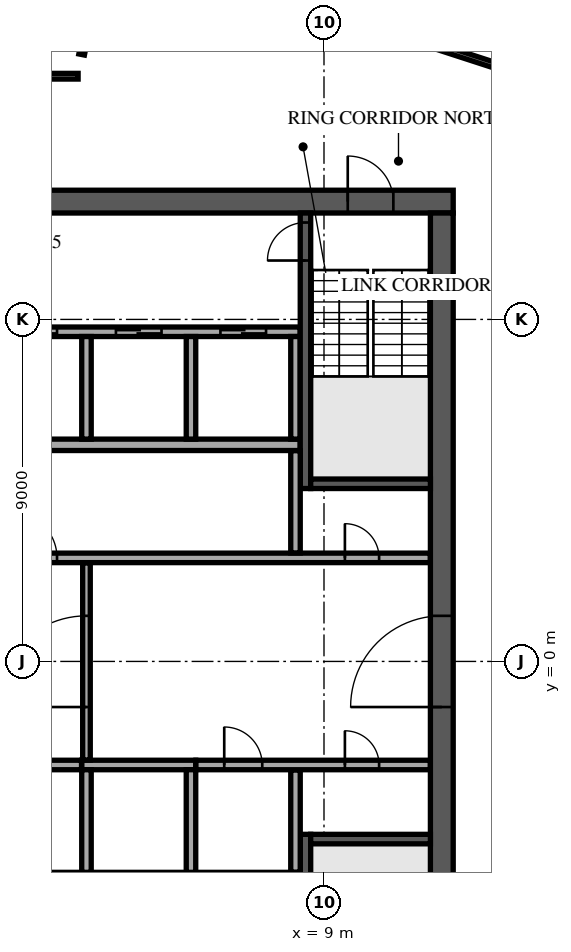
"""IFC4 building model, lengths in metres.
Left out: names, types, materials, properties, quantities, classifications, styles, units other than length and angle.
Written with IfcOpenShell. Run it as: python <this file> out.ifc"""

import sys

from ifc_helpers import new_model, si_unit, direction, frame, frame_2d, origin, place, context, subcontext, project, spatial, rectangle, extrude, element, fill, save


model = new_model("IFC4")
c1 = context("Model", 3, precision=1e-05, world=origin(), true_north=direction((0.0, 1.0)))
c2 = subcontext(c1, "Body", "Model", "MODEL_VIEW")
j1 = project(units=[si_unit("LENGTHUNIT", "METRE"), si_unit("PLANEANGLEUNIT", "RADIAN")], contexts=[c1])
p1 = place(None, origin())
s1 = spatial("IfcSite", under=j1, at=p1, CompositionType="ELEMENT")
p2 = place(p1, origin())
s2 = spatial("IfcBuilding", under=s1, at=p2, CompositionType="ELEMENT")
p3 = place(p2, frame((0.0, 0.0, 316.5)))
s3 = spatial("IfcBuildingStorey", under=s2, at=p3, CompositionType="ELEMENT", Elevation=316.5)
p4 = place(p3, frame((-12.4, 12.1, 0.0), z_axis=(0.0, 0.0, 1.0), x_axis=(1.0, 0.0, 0.0)))
e1 = element("IfcWall", 1, at=p4, inside=s3, PredefinedType="SHEAR", context=c2, shape_type="SweptSolid", body=[
    extrude(rectangle(XDim=24.8, YDim=0.6, at=frame_2d((12.4, 0.0))), origin(), (0.0, 0.0, 1.0), 3.65),
])
p5 = place(p4, frame((11.2, 0.0, 0.0)))
e2 = element("IfcOpeningElement", 2, at=p5, cuts=e1, PredefinedType="OPENING", context=c2, shape_type="SweptSolid", body=[
    extrude(rectangle(XDim=2.4, YDim=2.4, at=frame_2d((1.2, 1.2))), frame((0.0, 0.31, 0.0), z_axis=(0.0, -1.0, 0.0), x_axis=(1.0, 0.0, 0.0)), (0.0, 0.0, 1.0), 0.62),
])
p6 = place(p4, frame((22.025, 0.0, 0.0)))
e3 = element("IfcOpeningElement", 3, at=p6, cuts=e1, PredefinedType="OPENING", context=c2, shape_type="SweptSolid", body=[
    extrude(rectangle(XDim=1.2, YDim=2.1, at=frame_2d((0.6, 1.05))), frame((0.0, 0.31, 0.0), z_axis=(0.0, -1.0, 0.0), x_axis=(1.0, 0.0, 0.0)), (0.0, 0.0, 1.0), 0.62),
])
p7 = place(p4, frame((1.0, 0.0, 0.0)))
e4 = element("IfcOpeningElement", 4, at=p7, cuts=e1, PredefinedType="OPENING", context=c2, shape_type="SweptSolid", body=[
    extrude(rectangle(XDim=1.0, YDim=2.1, at=frame_2d((0.5, 1.05))), frame((0.0, 0.31, 0.0), z_axis=(0.0, -1.0, 0.0), x_axis=(1.0, 0.0, 0.0)), (0.0, 0.0, 1.0), 0.62),
])
p8 = place(p3, frame((12.1, -11.8, 0.0), z_axis=(0.0, 0.0, 1.0), x_axis=(0.0, 1.0, 0.0)))
e5 = element("IfcWall", 5, at=p8, inside=s3, PredefinedType="SHEAR", context=c2, shape_type="SweptSolid", body=[
    extrude(rectangle(XDim=23.6, YDim=0.6, at=frame_2d((11.8, 0.0))), origin(), (0.0, 0.0, 1.0), 3.65),
])
p9 = place(p8, frame((10.6, 0.0, 0.0)))
e6 = element("IfcOpeningElement", 6, at=p9, cuts=e5, PredefinedType="OPENING", context=c2, shape_type="SweptSolid", body=[
    extrude(rectangle(XDim=2.4, YDim=2.4, at=frame_2d((1.2, 1.2))), frame((0.0, 0.31, 0.0), z_axis=(0.0, -1.0, 0.0), x_axis=(1.0, 0.0, 0.0)), (0.0, 0.0, 1.0), 0.62),
])
p10 = place(p3, frame((-8.375, 5.7, 0.0), z_axis=(0.0, 0.0, 1.0), x_axis=(1.0, 0.0, 0.0)))
e7 = element("IfcWall", 7, at=p10, inside=s3, PredefinedType="SOLIDWALL", context=c2, shape_type="SweptSolid", body=[
    extrude(rectangle(XDim=16.75, YDim=0.3, at=frame_2d((8.375, 0.0))), origin(), (0.0, 0.0, 1.0), 3.65),
])
p11 = place(p3, frame((-2.875, -5.7, 0.0), z_axis=(0.0, 0.0, 1.0), x_axis=(1.0, 0.0, 0.0)))
e8 = element("IfcWall", 8, at=p11, inside=s3, PredefinedType="SOLIDWALL", context=c2, shape_type="SweptSolid", body=[
    extrude(rectangle(XDim=11.25, YDim=0.3, at=frame_2d((5.625, 0.0))), origin(), (0.0, 0.0, 1.0), 3.65),
])
p12 = place(p3, frame((-8.375, 8.675, 0.0), z_axis=(0.0, 0.0, 1.0), x_axis=(1.0, 0.0, 0.0)))
e9 = element("IfcWall", 9, at=p12, inside=s3, PredefinedType="SOLIDWALL", context=c2, shape_type="SweptSolid", body=[
    extrude(rectangle(XDim=16.75, YDim=0.25, at=frame_2d((8.375, 0.0))), origin(), (0.0, 0.0, 1.0), 3.65),
])
p13 = place(p12, frame((0.9, 0.0, 0.0)))
e10 = element("IfcOpeningElement", 10, at=p13, cuts=e9, PredefinedType="OPENING", context=c2, shape_type="SweptSolid", body=[
    extrude(rectangle(XDim=1.2, YDim=2.1, at=frame_2d((0.6, 1.05))), frame((0.0, 0.135, 0.0), z_axis=(0.0, -1.0, 0.0), x_axis=(1.0, 0.0, 0.0)), (0.0, 0.0, 1.0), 0.27),
])
p14 = place(p12, frame((3.65, 0.0, 0.0)))
e11 = element("IfcOpeningElement", 11, at=p14, cuts=e9, PredefinedType="OPENING", context=c2, shape_type="SweptSolid", body=[
    extrude(rectangle(XDim=1.2, YDim=2.1, at=frame_2d((0.6, 1.05))), frame((0.0, 0.135, 0.0), z_axis=(0.0, -1.0, 0.0), x_axis=(1.0, 0.0, 0.0)), (0.0, 0.0, 1.0), 0.27),
])
p15 = place(p12, frame((6.4, 0.0, 0.0)))
e12 = element("IfcOpeningElement", 12, at=p15, cuts=e9, PredefinedType="OPENING", context=c2, shape_type="SweptSolid", body=[
    extrude(rectangle(XDim=1.2, YDim=2.1, at=frame_2d((0.6, 1.05))), frame((0.0, 0.135, 0.0), z_axis=(0.0, -1.0, 0.0), x_axis=(1.0, 0.0, 0.0)), (0.0, 0.0, 1.0), 0.27),
])
p16 = place(p12, frame((9.15, 0.0, 0.0)))
e13 = element("IfcOpeningElement", 13, at=p16, cuts=e9, PredefinedType="OPENING", context=c2, shape_type="SweptSolid", body=[
    extrude(rectangle(XDim=1.2, YDim=2.1, at=frame_2d((0.6, 1.05))), frame((0.0, 0.135, 0.0), z_axis=(0.0, -1.0, 0.0), x_axis=(1.0, 0.0, 0.0)), (0.0, 0.0, 1.0), 0.27),
])
p17 = place(p12, frame((11.9, 0.0, 0.0)))
e14 = element("IfcOpeningElement", 14, at=p17, cuts=e9, PredefinedType="OPENING", context=c2, shape_type="SweptSolid", body=[
    extrude(rectangle(XDim=1.2, YDim=2.1, at=frame_2d((0.6, 1.05))), frame((0.0, 0.135, 0.0), z_axis=(0.0, -1.0, 0.0), x_axis=(1.0, 0.0, 0.0)), (0.0, 0.0, 1.0), 0.27),
])
p18 = place(p12, frame((14.65, 0.0, 0.0)))
e15 = element("IfcOpeningElement", 15, at=p18, cuts=e9, PredefinedType="OPENING", context=c2, shape_type="SweptSolid", body=[
    extrude(rectangle(XDim=1.2, YDim=2.1, at=frame_2d((0.6, 1.05))), frame((0.0, 0.135, 0.0), z_axis=(0.0, -1.0, 0.0), x_axis=(1.0, 0.0, 0.0)), (0.0, 0.0, 1.0), 0.27),
])
for number, where, z_axis, x_axis in (
    (16, (2.75, 5.85, 0.0), (0.0, 0.0, 1.0), (0.0, 1.0, 0.0)),
    (17, (5.5, 5.85, 0.0), (0.0, 0.0, 1.0), (0.0, 1.0, 0.0)),
    (18, (8.25, 5.85, 0.0), (0.0, 0.0, 1.0), (0.0, 1.0, 0.0)),
):
    element("IfcWall", number, at=place(p3, frame(where, z_axis=z_axis, x_axis=x_axis)), inside=s3, PredefinedType="SOLIDWALL", context=c2, shape_type="SweptSolid", body=[
        extrude(rectangle(XDim=2.7, YDim=0.25, at=frame_2d((1.35, 0.0))), origin(), (0.0, 0.0, 1.0), 3.65),
    ])
p19 = place(p3, frame((2.625, -2.725, 0.0), z_axis=(0.0, 0.0, 1.0), x_axis=(1.0, 0.0, 0.0)))
e19 = element("IfcWall", 19, at=p19, inside=s3, PredefinedType="SOLIDWALL", context=c2, shape_type="SweptSolid", body=[
    extrude(rectangle(XDim=3.0, YDim=0.25, at=frame_2d((1.5, 0.0))), origin(), (0.0, 0.0, 1.0), 3.65),
])
for number, where, z_axis, x_axis in (
    (20, (2.75, -5.55, 0.0), (0.0, 0.0, 1.0), (0.0, 1.0, 0.0)),
    (21, (5.5, -5.55, 0.0), (0.0, 0.0, 1.0), (0.0, 1.0, 0.0)),
):
    element("IfcWall", number, at=place(p3, frame(where, z_axis=z_axis, x_axis=x_axis)), inside=s3, PredefinedType="SOLIDWALL", context=c2, shape_type="SweptSolid", body=[
        extrude(rectangle(XDim=2.7, YDim=0.25, at=frame_2d((1.35, 0.0))), origin(), (0.0, 0.0, 1.0), 3.65),
    ])
p20 = place(p3, frame((8.512, 4.55, 0.0), z_axis=(0.0, 0.0, 1.0), x_axis=(0.0, 1.0, 0.0)))
e22 = element("IfcWall", 22, at=p20, inside=s3, PredefinedType="SOLIDWALL", context=c2, shape_type="SweptSolid", body=[
    extrude(rectangle(XDim=7.25, YDim=0.275, at=frame_2d((3.625, 0.0))), origin(), (0.0, 0.0, 1.0), 3.65),
])
p21 = place(p20, frame((6.0, 0.0, 0.0)))
e23 = element("IfcOpeningElement", 23, at=p21, cuts=e22, PredefinedType="OPENING", context=c2, shape_type="SweptSolid", body=[
    extrude(rectangle(XDim=1.0, YDim=2.1, at=frame_2d((0.5, 1.05))), frame((0.0, 0.147, 0.0), z_axis=(0.0, -1.0, 0.0), x_axis=(1.0, 0.0, 0.0)), (0.0, 0.0, 1.0), 0.295),
])
p22 = place(p3, frame((8.65, 4.675, 0.0), z_axis=(0.0, 0.0, 1.0), x_axis=(1.0, 0.0, 0.0)))
e24 = element("IfcWall", 24, at=p22, inside=s3, PredefinedType="SOLIDWALL", context=c2, shape_type="SweptSolid", body=[
    extrude(rectangle(XDim=3.15, YDim=0.25, at=frame_2d((1.575, 0.0))), origin(), (0.0, 0.0, 1.0), 3.65),
])
p23 = place(p3, frame((8.512, -4.55, 0.0), z_axis=(0.0, 0.0, 1.0), x_axis=(0.0, -1.0, 0.0)))
e25 = element("IfcWall", 25, at=p23, inside=s3, PredefinedType="SOLIDWALL", context=c2, shape_type="SweptSolid", body=[
    extrude(rectangle(XDim=7.25, YDim=0.275, at=frame_2d((3.625, 0.0))), origin(), (0.0, 0.0, 1.0), 3.65),
])
p24 = place(p23, frame((6.0, 0.0, 0.0)))
e26 = element("IfcOpeningElement", 26, at=p24, cuts=e25, PredefinedType="OPENING", context=c2, shape_type="SweptSolid", body=[
    extrude(rectangle(XDim=1.0, YDim=2.1, at=frame_2d((0.5, 1.05))), frame((0.0, 0.147, 0.0), z_axis=(0.0, -1.0, 0.0), x_axis=(1.0, 0.0, 0.0)), (0.0, 0.0, 1.0), 0.295),
])
p25 = place(p3, frame((8.65, -4.675, 0.0), z_axis=(0.0, 0.0, 1.0), x_axis=(1.0, 0.0, 0.0)))
e27 = element("IfcWall", 27, at=p25, inside=s3, PredefinedType="SOLIDWALL", context=c2, shape_type="SweptSolid", body=[
    extrude(rectangle(XDim=3.15, YDim=0.25, at=frame_2d((1.575, 0.0))), origin(), (0.0, 0.0, 1.0), 3.65),
])
p26 = place(p3, frame((8.25, -5.545, 0.0), z_axis=(0.0, 0.0, 1.0), x_axis=(0.0, 1.0, 0.0)))
e28 = element("IfcWall", 28, at=p26, inside=s3, PredefinedType="PARTITIONING", context=c2, shape_type="SweptSolid", body=[
    extrude(rectangle(XDim=2.69, YDim=0.25, at=frame_2d((1.345, 0.0))), origin(), (0.0, 0.0, 1.0), 3.65),
])
p27 = place(p3, frame((-11.795, -2.725, 0.0), z_axis=(0.0, 0.0, 1.0), x_axis=(1.0, 0.0, 0.0)))
e29 = element("IfcWall", 29, at=p27, inside=s3, PredefinedType="PARTITIONING", context=c2, shape_type="SweptSolid", body=[
    extrude(rectangle(XDim=14.415, YDim=0.25, at=frame_2d((7.208, 0.0))), origin(), (0.0, 0.0, 1.0), 3.65),
])
p28 = place(p27, frame((1.295, 0.0, 0.0)))
e30 = element("IfcOpeningElement", 30, at=p28, cuts=e29, PredefinedType="OPENING", context=c2, shape_type="SweptSolid", body=[
    extrude(rectangle(XDim=1.0, YDim=2.1, at=frame_2d((0.5, 1.05))), frame((0.0, 0.135, 0.0), z_axis=(0.0, -1.0, 0.0), x_axis=(1.0, 0.0, 0.0)), (0.0, 0.0, 1.0), 0.27),
])
p29 = place(p27, frame((4.42, 0.0, 0.0)))
e31 = element("IfcOpeningElement", 31, at=p29, cuts=e29, PredefinedType="OPENING", context=c2, shape_type="SweptSolid", body=[
    extrude(rectangle(XDim=1.0, YDim=2.1, at=frame_2d((0.5, 1.05))), frame((0.0, 0.135, 0.0), z_axis=(0.0, -1.0, 0.0), x_axis=(1.0, 0.0, 0.0)), (0.0, 0.0, 1.0), 0.27),
])
p30 = place(p27, frame((9.92, 0.0, 0.0)))
e32 = element("IfcOpeningElement", 32, at=p30, cuts=e29, PredefinedType="OPENING", context=c2, shape_type="SweptSolid", body=[
    extrude(rectangle(XDim=1.0, YDim=2.1, at=frame_2d((0.5, 1.05))), frame((0.0, 0.135, 0.0), z_axis=(0.0, -1.0, 0.0), x_axis=(1.0, 0.0, 0.0)), (0.0, 0.0, 1.0), 0.27),
])
p31 = place(p3, frame((5.63, -2.725, 0.0), z_axis=(0.0, 0.0, 1.0), x_axis=(1.0, 0.0, 0.0)))
e33 = element("IfcWall", 33, at=p31, inside=s3, PredefinedType="PARTITIONING", context=c2, shape_type="SweptSolid", body=[
    extrude(rectangle(XDim=6.165, YDim=0.25, at=frame_2d((3.083, 0.0))), origin(), (0.0, 0.0, 1.0), 3.65),
])
p32 = place(p31, frame((0.745, 0.0, 0.0)))
e34 = element("IfcOpeningElement", 34, at=p32, cuts=e33, PredefinedType="OPENING", context=c2, shape_type="SweptSolid", body=[
    extrude(rectangle(XDim=1.0, YDim=2.1, at=frame_2d((0.5, 1.05))), frame((0.0, 0.135, 0.0), z_axis=(0.0, -1.0, 0.0), x_axis=(1.0, 0.0, 0.0)), (0.0, 0.0, 1.0), 0.27),
])
p33 = place(p31, frame((3.92, 0.0, 0.0)))
e35 = element("IfcOpeningElement", 35, at=p33, cuts=e33, PredefinedType="OPENING", context=c2, shape_type="SweptSolid", body=[
    extrude(rectangle(XDim=0.9, YDim=2.1, at=frame_2d((0.45, 1.05))), frame((0.0, 0.135, 0.0), z_axis=(0.0, -1.0, 0.0), x_axis=(1.0, 0.0, 0.0)), (0.0, 0.0, 1.0), 0.27),
])
p34 = place(p3, frame((2.75, -2.595, 0.0), z_axis=(0.0, 0.0, 1.0), x_axis=(0.0, 1.0, 0.0)))
e36 = element("IfcWall", 36, at=p34, inside=s3, PredefinedType="PARTITIONING", context=c2, shape_type="SweptSolid", body=[
    extrude(rectangle(XDim=5.19, YDim=0.2, at=frame_2d((2.595, 0.0))), origin(), (0.0, 0.0, 1.0), 3.65),
])
p35 = place(p34, frame((1.395, 0.0, 0.0)))
e37 = element("IfcOpeningElement", 37, at=p35, cuts=e36, PredefinedType="OPENING", context=c2, shape_type="SweptSolid", body=[
    extrude(rectangle(XDim=2.4, YDim=2.4, at=frame_2d((1.2, 1.2))), frame((0.0, 0.11, 0.0), z_axis=(0.0, -1.0, 0.0), x_axis=(1.0, 0.0, 0.0)), (0.0, 0.0, 1.0), 0.22),
])
p36 = place(p3, frame((-11.795, 2.725, 0.0), z_axis=(0.0, 0.0, 1.0), x_axis=(1.0, 0.0, 0.0)))
e38 = element("IfcWall", 38, at=p36, inside=s3, PredefinedType="PARTITIONING", context=c2, shape_type="SweptSolid", body=[
    extrude(rectangle(XDim=23.59, YDim=0.25, at=frame_2d((11.795, 0.0))), origin(), (0.0, 0.0, 1.0), 3.65),
])
p37 = place(p36, frame((21.345, 0.0, 0.0)))
e39 = element("IfcOpeningElement", 39, at=p37, cuts=e38, PredefinedType="OPENING", context=c2, shape_type="SweptSolid", body=[
    extrude(rectangle(XDim=0.9, YDim=2.1, at=frame_2d((0.45, 1.05))), frame((0.0, 0.135, 0.0), z_axis=(0.0, -1.0, 0.0), x_axis=(1.0, 0.0, 0.0)), (0.0, 0.0, 1.0), 0.27),
])
p38 = place(p36, frame((1.345, 0.0, 0.0)))
e40 = element("IfcOpeningElement", 40, at=p38, cuts=e38, PredefinedType="OPENING", context=c2, shape_type="SweptSolid", body=[
    extrude(rectangle(XDim=0.9, YDim=2.1, at=frame_2d((0.45, 1.05))), frame((0.0, 0.135, 0.0), z_axis=(0.0, -1.0, 0.0), x_axis=(1.0, 0.0, 0.0)), (0.0, 0.0, 1.0), 0.27),
])
p39 = place(p36, frame((4.42, 0.0, 0.0)))
e41 = element("IfcOpeningElement", 41, at=p39, cuts=e38, PredefinedType="OPENING", context=c2, shape_type="SweptSolid", body=[
    extrude(rectangle(XDim=1.0, YDim=2.1, at=frame_2d((0.5, 1.05))), frame((0.0, 0.135, 0.0), z_axis=(0.0, -1.0, 0.0), x_axis=(1.0, 0.0, 0.0)), (0.0, 0.0, 1.0), 0.27),
])
p40 = place(p36, frame((7.17, 0.0, 0.0)))
e42 = element("IfcOpeningElement", 42, at=p40, cuts=e38, PredefinedType="OPENING", context=c2, shape_type="SweptSolid", body=[
    extrude(rectangle(XDim=1.0, YDim=2.1, at=frame_2d((0.5, 1.05))), frame((0.0, 0.135, 0.0), z_axis=(0.0, -1.0, 0.0), x_axis=(1.0, 0.0, 0.0)), (0.0, 0.0, 1.0), 0.27),
])
p41 = place(p36, frame((12.57, 0.0, 0.0)))
e43 = element("IfcOpeningElement", 43, at=p41, cuts=e38, PredefinedType="OPENING", context=c2, shape_type="SweptSolid", body=[
    extrude(rectangle(XDim=1.2, YDim=2.1, at=frame_2d((0.6, 1.05))), frame((0.0, 0.135, 0.0), z_axis=(0.0, -1.0, 0.0), x_axis=(1.0, 0.0, 0.0)), (0.0, 0.0, 1.0), 0.27),
])
p42 = place(p3, frame((8.25, 2.855, 0.0), z_axis=(0.0, 0.0, 1.0), x_axis=(0.0, 1.0, 0.0)))
e44 = element("IfcWall", 44, at=p42, inside=s3, PredefinedType="PARTITIONING", context=c2, shape_type="SweptSolid", body=[
    extrude(rectangle(XDim=2.69, YDim=0.25, at=frame_2d((1.345, 0.0))), origin(), (0.0, 0.0, 1.0), 3.65),
])
p43 = place(p3, frame((-10.964, 23.635, 0.0), z_axis=(0.0, 0.0, 1.0), x_axis=(0.951055018443, -0.309021604252, 0.0)))
e45 = element("IfcWall", 45, at=p43, inside=s3, PredefinedType="PARTITIONING", context=c2, shape_type="SweptSolid", body=[
    extrude(rectangle(XDim=35.537, YDim=0.15, at=frame_2d((17.769, 0.0))), origin(), (0.0, 0.0, 1.0), 3.25),
])
p44 = place(p43, frame((9.554, 0.0, 0.0)))
e46 = element("IfcOpeningElement", 46, at=p44, cuts=e45, PredefinedType="OPENING", context=c2, shape_type="SweptSolid", body=[
    extrude(rectangle(XDim=1.0, YDim=2.1, at=frame_2d((0.5, 1.05))), frame((0.0, 0.085, 0.0), z_axis=(0.0, -1.0, 0.0), x_axis=(1.0, 0.0, 0.0)), (0.0, 0.0, 1.0), 0.17),
])
p45 = place(p43, frame((14.629, 0.0, 0.0)))
e47 = element("IfcOpeningElement", 47, at=p45, cuts=e45, PredefinedType="OPENING", context=c2, shape_type="SweptSolid", body=[
    extrude(rectangle(XDim=1.0, YDim=2.1, at=frame_2d((0.5, 1.05))), frame((0.0, 0.085, 0.0), z_axis=(0.0, -1.0, 0.0), x_axis=(1.0, 0.0, 0.0)), (0.0, 0.0, 1.0), 0.17),
])
p46 = place(p43, frame((27.287, 0.0, 0.0)))
e48 = element("IfcOpeningElement", 48, at=p46, cuts=e45, PredefinedType="OPENING", context=c2, shape_type="SweptSolid", body=[
    extrude(rectangle(XDim=1.0, YDim=2.1, at=frame_2d((0.5, 1.05))), frame((0.0, 0.085, 0.0), z_axis=(0.0, -1.0, 0.0), x_axis=(1.0, 0.0, 0.0)), (0.0, 0.0, 1.0), 0.17),
])
p47 = place(p43, frame((29.988, 0.0, 0.0)))
e49 = element("IfcOpeningElement", 49, at=p47, cuts=e45, PredefinedType="OPENING", context=c2, shape_type="SweptSolid", body=[
    extrude(rectangle(XDim=1.8, YDim=2.1, at=frame_2d((0.9, 1.05))), frame((0.0, 0.085, 0.0), z_axis=(0.0, -1.0, 0.0), x_axis=(1.0, 0.0, 0.0)), (0.0, 0.0, 1.0), 0.17),
])
p48 = place(p3, frame((-7.65, 15.4, 0.0), z_axis=(0.0, 0.0, 1.0), x_axis=(1.0, 0.0, 0.0)))
e50 = element("IfcWall", 50, at=p48, inside=s3, PredefinedType="PARTITIONING", context=c2, shape_type="SweptSolid", body=[
    extrude(rectangle(XDim=10.18, YDim=0.15, at=frame_2d((5.09, 0.0))), origin(), (0.0, 0.0, 1.0), 3.25),
])
p49 = place(p3, frame((2.708, 16.4, 0.0), z_axis=(0.0, 0.0, 1.0), x_axis=(-0.193004252624, -0.981197920131, 0.0)))
e51 = element("IfcWall", 51, at=p49, inside=s3, PredefinedType="PARTITIONING", context=c2, shape_type="SweptSolid", body=[
    extrude(rectangle(XDim=0.438, YDim=0.15, at=frame_2d((0.219, 0.0))), origin(), (0.0, 0.0, 1.0), 3.25),
])
p50 = place(p6, origin())
e52 = element("IfcDoor", 52, at=p50, inside=s3, OperationType="SINGLE_SWING_LEFT", PredefinedType="DOOR", context=c2, shape_type="SweptSolid", body=[
    extrude(rectangle(XDim=1.2, YDim=2.1, at=frame_2d((0.6, 1.05))), frame((0.0, 0.025, 0.0), z_axis=(0.0, -1.0, 0.0), x_axis=(1.0, 0.0, 0.0)), (0.0, 0.0, 1.0), 0.05),
])
fill(e3, e52)
p51 = place(p9, origin())
e53 = element("IfcDoor", 53, at=p51, inside=s3, OperationType="SINGLE_SWING_LEFT", PredefinedType="DOOR", context=c2, shape_type="SweptSolid", body=[
    extrude(rectangle(XDim=2.4, YDim=2.4, at=frame_2d((1.2, 1.2))), frame((0.0, 0.025, 0.0), z_axis=(0.0, -1.0, 0.0), x_axis=(1.0, 0.0, 0.0)), (0.0, 0.0, 1.0), 0.05),
])
fill(e6, e53)
p52 = place(p16, origin())
e54 = element("IfcDoor", 54, at=p52, inside=s3, OperationType="DOUBLE_DOOR_SLIDING", PredefinedType="DOOR", context=c2, shape_type="SweptSolid", body=[
    extrude(rectangle(XDim=1.2, YDim=2.1, at=frame_2d((0.6, 1.05))), frame((0.0, 0.025, 0.0), z_axis=(0.0, -1.0, 0.0), x_axis=(1.0, 0.0, 0.0)), (0.0, 0.0, 1.0), 0.05),
])
fill(e13, e54)
p53 = place(p17, origin())
e55 = element("IfcDoor", 55, at=p53, inside=s3, OperationType="DOUBLE_DOOR_SLIDING", PredefinedType="DOOR", context=c2, shape_type="SweptSolid", body=[
    extrude(rectangle(XDim=1.2, YDim=2.1, at=frame_2d((0.6, 1.05))), frame((0.0, 0.025, 0.0), z_axis=(0.0, -1.0, 0.0), x_axis=(1.0, 0.0, 0.0)), (0.0, 0.0, 1.0), 0.05),
])
fill(e14, e55)
p54 = place(p18, origin())
e56 = element("IfcDoor", 56, at=p54, inside=s3, OperationType="DOUBLE_DOOR_SLIDING", PredefinedType="DOOR", context=c2, shape_type="SweptSolid", body=[
    extrude(rectangle(XDim=1.2, YDim=2.1, at=frame_2d((0.6, 1.05))), frame((0.0, 0.025, 0.0), z_axis=(0.0, -1.0, 0.0), x_axis=(1.0, 0.0, 0.0)), (0.0, 0.0, 1.0), 0.05),
])
fill(e15, e56)
p55 = place(p21, origin())
e57 = element("IfcDoor", 57, at=p55, inside=s3, OperationType="SINGLE_SWING_LEFT", PredefinedType="DOOR", context=c2, shape_type="SweptSolid", body=[
    extrude(rectangle(XDim=1.0, YDim=2.1, at=frame_2d((0.5, 1.05))), frame((0.0, 0.025, 0.0), z_axis=(0.0, -1.0, 0.0), x_axis=(1.0, 0.0, 0.0)), (0.0, 0.0, 1.0), 0.05),
])
fill(e23, e57)
p56 = place(p32, origin())
e58 = element("IfcDoor", 58, at=p56, inside=s3, OperationType="SINGLE_SWING_RIGHT", PredefinedType="DOOR", context=c2, shape_type="SweptSolid", body=[
    extrude(rectangle(XDim=1.0, YDim=2.1, at=frame_2d((0.5, 1.05))), frame((0.0, 0.025, 0.0), z_axis=(0.0, -1.0, 0.0), x_axis=(1.0, 0.0, 0.0)), (0.0, 0.0, 1.0), 0.05),
])
fill(e34, e58)
p57 = place(p37, origin())
e59 = element("IfcDoor", 59, at=p57, inside=s3, OperationType="SINGLE_SWING_RIGHT", PredefinedType="DOOR", context=c2, shape_type="SweptSolid", body=[
    extrude(rectangle(XDim=0.9, YDim=2.1, at=frame_2d((0.45, 1.05))), frame((0.0, 0.025, 0.0), z_axis=(0.0, -1.0, 0.0), x_axis=(1.0, 0.0, 0.0)), (0.0, 0.0, 1.0), 0.05),
])
fill(e39, e59)
p58 = place(p33, origin())
e60 = element("IfcDoor", 60, at=p58, inside=s3, OperationType="SINGLE_SWING_RIGHT", PredefinedType="DOOR", context=c2, shape_type="SweptSolid", body=[
    extrude(rectangle(XDim=0.9, YDim=2.1, at=frame_2d((0.45, 1.05))), frame((0.0, 0.025, 0.0), z_axis=(0.0, -1.0, 0.0), x_axis=(1.0, 0.0, 0.0)), (0.0, 0.0, 1.0), 0.05),
])
fill(e35, e60)
p59 = place(p41, origin())
e61 = element("IfcDoor", 61, at=p59, inside=s3, OperationType="SINGLE_SWING_LEFT", PredefinedType="DOOR", context=c2, shape_type="SweptSolid", body=[
    extrude(rectangle(XDim=1.2, YDim=2.1, at=frame_2d((0.6, 1.05))), frame((0.0, 0.025, 0.0), z_axis=(0.0, -1.0, 0.0), x_axis=(1.0, 0.0, 0.0)), (0.0, 0.0, 1.0), 0.05),
])
fill(e43, e61)
p60 = place(p35, origin())
e62 = element("IfcDoor", 62, at=p60, inside=s3, OperationType="DOUBLE_DOOR_DOUBLE_SWING", PredefinedType="DOOR", context=c2, shape_type="SweptSolid", body=[
    extrude(rectangle(XDim=2.4, YDim=2.4, at=frame_2d((1.2, 1.2))), frame((0.0, 0.025, 0.0), z_axis=(0.0, -1.0, 0.0), x_axis=(1.0, 0.0, 0.0)), (0.0, 0.0, 1.0), 0.05),
])
fill(e37, e62)
save(model, sys.argv[1])
